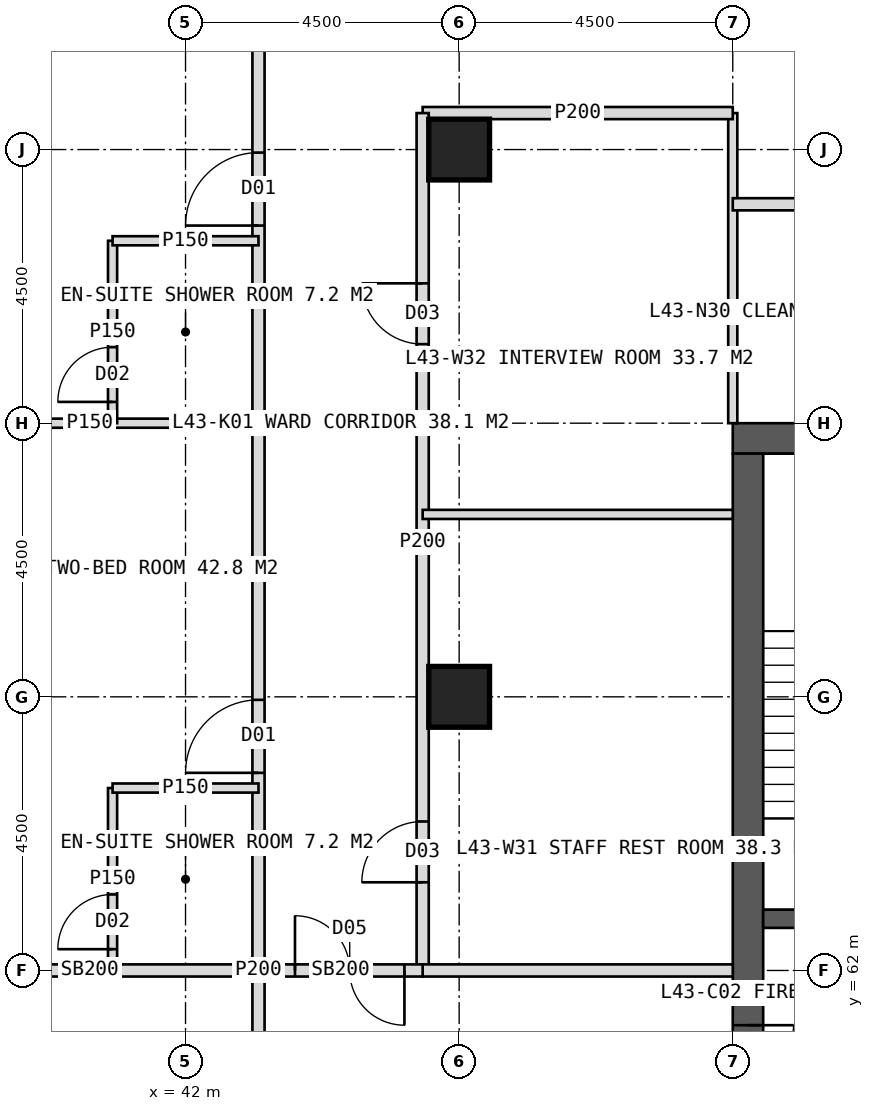
"""IFC4 building model, lengths in metres.
Left out: names, types, materials, properties, quantities, classifications, styles, units other than length and angle.
Written with IfcOpenShell. Run it as: python <this file> out.ifc"""

import sys

from ifc_helpers import new_model, si_unit, direction, frame, frame_2d, origin, origin_2d, place, context, subcontext, project, spatial, rectangle, hollow_rectangle, extrude, element, fill, save


model = new_model("IFC4")
c1 = context("Model", 3, precision=1e-05, world=origin(), true_north=direction((0.0, 1.0)))
c2 = subcontext(c1, "Body", "Model", "MODEL_VIEW")
j1 = project(units=[si_unit("LENGTHUNIT", "METRE"), si_unit("PLANEANGLEUNIT", "RADIAN")], contexts=[c1])
p1 = place(None, origin())
s1 = spatial("IfcSite", under=j1, at=p1, CompositionType="ELEMENT")
p2 = place(p1, origin())
s2 = spatial("IfcBuilding", under=s1, at=p2, CompositionType="ELEMENT")
p3 = place(p2, frame((0.0, 0.0, 181.0)))
s3 = spatial("IfcBuildingStorey", under=s2, at=p3, CompositionType="ELEMENT", Elevation=181.0)
p4 = place(p3, frame((51.0, 70.75, 0.0), z_axis=(0.0, 0.0, 1.0), x_axis=(1.0, 0.0, 0.0)))
e1 = element("IfcWall", 1, at=p4, inside=s3, PredefinedType="SHEAR", context=c2, shape_type="SweptSolid", body=[
    extrude(rectangle(XDim=18.0, YDim=0.5, at=frame_2d((9.0, 0.0))), origin(), (0.0, 0.0, 1.0), 4.0),
])
p5 = place(p4, frame((8.1, 0.0, 0.0)))
e2 = element("IfcOpeningElement", 2, at=p5, cuts=e1, PredefinedType="OPENING", context=c2, shape_type="SweptSolid", body=[
    extrude(rectangle(XDim=1.8, YDim=2.2, at=frame_2d((0.9, 1.1))), frame((0.0, 0.26, 0.0), z_axis=(0.0, -1.0, 0.0), x_axis=(1.0, 0.0, 0.0)), (0.0, 0.0, 1.0), 0.52),
])
p6 = place(p3, frame((51.25, 53.5, 0.0), z_axis=(0.0, 0.0, 1.0), x_axis=(0.0, 1.0, 0.0)))
e3 = element("IfcWall", 3, at=p6, inside=s3, PredefinedType="SHEAR", context=c2, shape_type="SweptSolid", body=[
    extrude(rectangle(XDim=17.0, YDim=0.5, at=frame_2d((8.5, 0.0))), origin(), (0.0, 0.0, 1.0), 4.0),
])
p7 = place(p6, frame((6.1, 0.0, 0.0)))
e4 = element("IfcOpeningElement", 4, at=p7, cuts=e3, PredefinedType="OPENING", context=c2, shape_type="SweptSolid", body=[
    extrude(rectangle(XDim=1.5, YDim=2.2, at=frame_2d((0.75, 1.1))), frame((0.0, 0.26, 0.0), z_axis=(0.0, -1.0, 0.0), x_axis=(1.0, 0.0, 0.0)), (0.0, 0.0, 1.0), 0.52),
])
p8 = place(p3, frame((51.5, 62.85, 0.0), z_axis=(0.0, 0.0, 1.0), x_axis=(1.0, 0.0, 0.0)))
e5 = element("IfcWall", 5, at=p8, inside=s3, PredefinedType="SHEAR", context=c2, shape_type="SweptSolid", body=[
    extrude(rectangle(XDim=3.3, YDim=0.3, at=frame_2d((1.65, 0.0))), origin(), (0.0, 0.0, 1.0), 4.0),
])
p9 = place(p8, frame((1.15, 0.0, 0.0)))
e6 = element("IfcOpeningElement", 6, at=p9, cuts=e5, PredefinedType="OPENING", context=c2, shape_type="SweptSolid", body=[
    extrude(rectangle(XDim=1.2, YDim=2.1, at=frame_2d((0.6, 1.05))), frame((0.0, 0.16, 0.0), z_axis=(0.0, -1.0, 0.0), x_axis=(1.0, 0.0, 0.0)), (0.0, 0.0, 1.0), 0.32),
])
for number, where, z_axis, x_axis in (
    (7, (46.5, 75.5, 0.0), (0.0, 0.0, 1.0), (1.0, 0.0, 0.0)),
    (8, (46.5, 66.5, 0.0), (0.0, 0.0, 1.0), (1.0, 0.0, 0.0)),
):
    element("IfcColumn", number, at=place(p3, frame(where, z_axis=z_axis, x_axis=x_axis)), inside=s3, PredefinedType="COLUMN", context=c2, shape_type="SweptSolid", body=[
        extrude(hollow_rectangle(XDim=1.0, YDim=1.0, WallThickness=0.1, at=origin_2d()), origin(), (0.0, 0.0, 1.0), 4.0),
    ])
p10 = place(p3, frame((51.0, 71.0, 0.0), z_axis=(0.0, 0.0, 1.0), x_axis=(0.0, 1.0, 0.0)))
e9 = element("IfcWall", 9, at=p10, inside=s3, PredefinedType="PARTITIONING", context=c2, shape_type="SweptSolid", body=[
    extrude(rectangle(XDim=5.1, YDim=0.15, at=frame_2d((2.55, 0.0))), origin(), (0.0, 0.0, 1.0), 3.75),
])
p11 = place(p3, frame((45.9, 76.1, 0.0), z_axis=(0.0, 0.0, 1.0), x_axis=(1.0, 0.0, 0.0)))
e10 = element("IfcWall", 10, at=p11, inside=s3, PredefinedType="PARTITIONING", context=c2, shape_type="SweptSolid", body=[
    extrude(rectangle(XDim=5.1, YDim=0.2, at=frame_2d((2.55, 0.0))), origin(), (0.0, 0.0, 1.0), 3.75),
])
p12 = place(p3, frame((51.0, 74.6, 0.0), z_axis=(0.0, 0.0, 1.0), x_axis=(1.0, 0.0, 0.0)))
e11 = element("IfcWall", 11, at=p12, inside=s3, PredefinedType="PARTITIONING", context=c2, shape_type="SweptSolid", body=[
    extrude(rectangle(XDim=6.75, YDim=0.2, at=frame_2d((3.375, 0.0))), origin(), (0.0, 0.0, 1.0), 3.75),
])
p13 = place(p12, frame((1.45, 0.0, 0.0)))
e12 = element("IfcOpeningElement", 12, at=p13, cuts=e11, PredefinedType="OPENING", context=c2, shape_type="SweptSolid", body=[
    extrude(rectangle(XDim=1.0, YDim=2.1, at=frame_2d((0.5, 1.05))), frame((0.0, 0.11, 0.0), z_axis=(0.0, -1.0, 0.0), x_axis=(1.0, 0.0, 0.0)), (0.0, 0.0, 1.0), 0.22),
])
p14 = place(p3, frame((43.2, 62.0, 0.0), z_axis=(0.0, 0.0, 1.0), x_axis=(-1.0, 0.0, 0.0)))
e13 = element("IfcWall", 13, at=p14, inside=s3, PredefinedType="SOLIDWALL", context=c2, shape_type="SweptSolid", body=[
    extrude(rectangle(XDim=5.55, YDim=0.2, at=frame_2d((2.775, 0.0))), origin(), (0.0, 0.0, 1.0), 2.95),
])
p15 = place(p3, frame((43.2, 71.0, 0.0), z_axis=(0.0, 0.0, 1.0), x_axis=(-1.0, 0.0, 0.0)))
e14 = element("IfcWall", 14, at=p15, inside=s3, PredefinedType="PARTITIONING", context=c2, shape_type="SweptSolid", body=[
    extrude(rectangle(XDim=5.55, YDim=0.15, at=frame_2d((2.775, 0.0))), origin(), (0.0, 0.0, 1.0), 3.75),
])
p16 = place(p3, frame((43.2, 45.2, 0.0), z_axis=(0.0, 0.0, 1.0), x_axis=(0.0, 1.0, 0.0)))
e15 = element("IfcWall", 15, at=p16, inside=s3, PredefinedType="PARTITIONING", context=c2, shape_type="SweptSolid", body=[
    extrude(rectangle(XDim=33.6, YDim=0.2, at=frame_2d((16.8, 0.0))), origin(), (0.0, 0.0, 1.0), 3.75),
])
p17 = place(p16, frame((2.65, 0.0, 0.0)))
e16 = element("IfcOpeningElement", 16, at=p17, cuts=e15, PredefinedType="OPENING", context=c2, shape_type="SweptSolid", body=[
    extrude(rectangle(XDim=1.2, YDim=2.2, at=frame_2d((0.6, 1.1))), frame((0.0, 0.11, 0.0), z_axis=(0.0, -1.0, 0.0), x_axis=(1.0, 0.0, 0.0)), (0.0, 0.0, 1.0), 0.22),
])
p18 = place(p16, frame((13.45, 0.0, 0.0)))
e17 = element("IfcOpeningElement", 17, at=p18, cuts=e15, PredefinedType="OPENING", context=c2, shape_type="SweptSolid", body=[
    extrude(rectangle(XDim=1.2, YDim=2.2, at=frame_2d((0.6, 1.1))), frame((0.0, 0.11, 0.0), z_axis=(0.0, -1.0, 0.0), x_axis=(1.0, 0.0, 0.0)), (0.0, 0.0, 1.0), 0.22),
])
p19 = place(p16, frame((20.05, 0.0, 0.0)))
e18 = element("IfcOpeningElement", 18, at=p19, cuts=e15, PredefinedType="OPENING", context=c2, shape_type="SweptSolid", body=[
    extrude(rectangle(XDim=1.2, YDim=2.2, at=frame_2d((0.6, 1.1))), frame((0.0, 0.11, 0.0), z_axis=(0.0, -1.0, 0.0), x_axis=(1.0, 0.0, 0.0)), (0.0, 0.0, 1.0), 0.22),
])
p20 = place(p16, frame((29.05, 0.0, 0.0)))
e19 = element("IfcOpeningElement", 19, at=p20, cuts=e15, PredefinedType="OPENING", context=c2, shape_type="SweptSolid", body=[
    extrude(rectangle(XDim=1.2, YDim=2.2, at=frame_2d((0.6, 1.1))), frame((0.0, 0.11, 0.0), z_axis=(0.0, -1.0, 0.0), x_axis=(1.0, 0.0, 0.0)), (0.0, 0.0, 1.0), 0.22),
])
p21 = place(p3, frame((40.8, 62.0, 0.0), z_axis=(0.0, 0.0, 1.0), x_axis=(0.0, 1.0, 0.0)))
e20 = element("IfcWall", 20, at=p21, inside=s3, PredefinedType="PARTITIONING", context=c2, shape_type="SweptSolid", body=[
    extrude(rectangle(XDim=3.0, YDim=0.15, at=frame_2d((1.5, 0.0))), origin(), (0.0, 0.0, 1.0), 3.75),
])
p22 = place(p21, frame((0.35, 0.0, 0.0)))
e21 = element("IfcOpeningElement", 21, at=p22, cuts=e20, PredefinedType="OPENING", context=c2, shape_type="SweptSolid", body=[
    extrude(rectangle(XDim=0.9, YDim=2.1, at=frame_2d((0.45, 1.05))), frame((0.0, 0.085, 0.0), z_axis=(0.0, -1.0, 0.0), x_axis=(1.0, 0.0, 0.0)), (0.0, 0.0, 1.0), 0.17),
])
p23 = place(p3, frame((43.2, 65.0, 0.0), z_axis=(0.0, 0.0, 1.0), x_axis=(-1.0, 0.0, 0.0)))
e22 = element("IfcWall", 22, at=p23, inside=s3, PredefinedType="PARTITIONING", context=c2, shape_type="SweptSolid", body=[
    extrude(rectangle(XDim=2.4, YDim=0.15, at=frame_2d((1.2, 0.0))), origin(), (0.0, 0.0, 1.0), 3.75),
])
p24 = place(p3, frame((40.8, 71.0, 0.0), z_axis=(0.0, 0.0, 1.0), x_axis=(0.0, 1.0, 0.0)))
e23 = element("IfcWall", 23, at=p24, inside=s3, PredefinedType="PARTITIONING", context=c2, shape_type="SweptSolid", body=[
    extrude(rectangle(XDim=3.0, YDim=0.15, at=frame_2d((1.5, 0.0))), origin(), (0.0, 0.0, 1.0), 3.75),
])
p25 = place(p24, frame((0.35, 0.0, 0.0)))
e24 = element("IfcOpeningElement", 24, at=p25, cuts=e23, PredefinedType="OPENING", context=c2, shape_type="SweptSolid", body=[
    extrude(rectangle(XDim=0.9, YDim=2.1, at=frame_2d((0.45, 1.05))), frame((0.0, 0.085, 0.0), z_axis=(0.0, -1.0, 0.0), x_axis=(1.0, 0.0, 0.0)), (0.0, 0.0, 1.0), 0.17),
])
p26 = place(p3, frame((43.2, 74.0, 0.0), z_axis=(0.0, 0.0, 1.0), x_axis=(-1.0, 0.0, 0.0)))
e25 = element("IfcWall", 25, at=p26, inside=s3, PredefinedType="PARTITIONING", context=c2, shape_type="SweptSolid", body=[
    extrude(rectangle(XDim=2.4, YDim=0.15, at=frame_2d((1.2, 0.0))), origin(), (0.0, 0.0, 1.0), 3.75),
])
p27 = place(p3, frame((45.9, 62.0, 0.0), z_axis=(0.0, 0.0, 1.0), x_axis=(0.0, 1.0, 0.0)))
e26 = element("IfcWall", 26, at=p27, inside=s3, PredefinedType="PARTITIONING", context=c2, shape_type="SweptSolid", body=[
    extrude(rectangle(XDim=14.1, YDim=0.2, at=frame_2d((7.05, 0.0))), origin(), (0.0, 0.0, 1.0), 3.75),
])
p28 = place(p27, frame((1.45, 0.0, 0.0)))
e27 = element("IfcOpeningElement", 27, at=p28, cuts=e26, PredefinedType="OPENING", context=c2, shape_type="SweptSolid", body=[
    extrude(rectangle(XDim=1.0, YDim=2.1, at=frame_2d((0.5, 1.05))), frame((0.0, 0.11, 0.0), z_axis=(0.0, -1.0, 0.0), x_axis=(1.0, 0.0, 0.0)), (0.0, 0.0, 1.0), 0.22),
])
p29 = place(p27, frame((10.3, 0.0, 0.0)))
e28 = element("IfcOpeningElement", 28, at=p29, cuts=e26, PredefinedType="OPENING", context=c2, shape_type="SweptSolid", body=[
    extrude(rectangle(XDim=1.0, YDim=2.1, at=frame_2d((0.5, 1.05))), frame((0.0, 0.11, 0.0), z_axis=(0.0, -1.0, 0.0), x_axis=(1.0, 0.0, 0.0)), (0.0, 0.0, 1.0), 0.22),
])
p30 = place(p3, frame((51.0, 62.0, 0.0), z_axis=(0.0, 0.0, 1.0), x_axis=(-1.0, 0.0, 0.0)))
e29 = element("IfcWall", 29, at=p30, inside=s3, PredefinedType="SOLIDWALL", context=c2, shape_type="SweptSolid", body=[
    extrude(rectangle(XDim=5.1, YDim=0.2, at=frame_2d((2.55, 0.0))), origin(), (0.0, 0.0, 1.0), 2.95),
])
p31 = place(p3, frame((51.0, 69.5, 0.0), z_axis=(0.0, 0.0, 1.0), x_axis=(-1.0, 0.0, 0.0)))
e30 = element("IfcWall", 30, at=p31, inside=s3, PredefinedType="PARTITIONING", context=c2, shape_type="SweptSolid", body=[
    extrude(rectangle(XDim=5.1, YDim=0.15, at=frame_2d((2.55, 0.0))), origin(), (0.0, 0.0, 1.0), 3.75),
])
p32 = place(p3, frame((45.9, 62.0, 0.0), z_axis=(0.0, 0.0, 1.0), x_axis=(-1.0, 0.0, 0.0)))
e31 = element("IfcWall", 31, at=p32, inside=s3, PredefinedType="SOLIDWALL", context=c2, shape_type="SweptSolid", body=[
    extrude(rectangle(XDim=2.7, YDim=0.2, at=frame_2d((1.35, 0.0))), origin(), (0.0, 0.0, 1.0), 2.95),
])
p33 = place(p32, frame((0.3, 0.0, 0.0)))
e32 = element("IfcOpeningElement", 32, at=p33, cuts=e31, PredefinedType="OPENING", context=c2, shape_type="SweptSolid", body=[
    extrude(rectangle(XDim=1.8, YDim=2.2, at=frame_2d((0.9, 1.1))), frame((0.0, 0.11, 0.0), z_axis=(0.0, -1.0, 0.0), x_axis=(1.0, 0.0, 0.0)), (0.0, 0.0, 1.0), 0.22),
])
p34 = place(p19, origin())
e33 = element("IfcDoor", 33, at=p34, inside=s3, OperationType="SINGLE_SWING_LEFT", PredefinedType="DOOR", context=c2, shape_type="SweptSolid", body=[
    extrude(rectangle(XDim=1.2, YDim=2.2, at=frame_2d((0.6, 1.1))), frame((0.0, 0.025, 0.0), z_axis=(0.0, -1.0, 0.0), x_axis=(1.0, 0.0, 0.0)), (0.0, 0.0, 1.0), 0.05),
])
fill(e18, e33)
p35 = place(p22, origin())
e34 = element("IfcDoor", 34, at=p35, inside=s3, OperationType="SINGLE_SWING_LEFT", PredefinedType="DOOR", context=c2, shape_type="SweptSolid", body=[
    extrude(rectangle(XDim=0.9, YDim=2.1, at=frame_2d((0.45, 1.05))), frame((0.0, 0.025, 0.0), z_axis=(0.0, -1.0, 0.0), x_axis=(1.0, 0.0, 0.0)), (0.0, 0.0, 1.0), 0.05),
])
fill(e21, e34)
p36 = place(p20, origin())
e35 = element("IfcDoor", 35, at=p36, inside=s3, OperationType="SINGLE_SWING_LEFT", PredefinedType="DOOR", context=c2, shape_type="SweptSolid", body=[
    extrude(rectangle(XDim=1.2, YDim=2.2, at=frame_2d((0.6, 1.1))), frame((0.0, 0.025, 0.0), z_axis=(0.0, -1.0, 0.0), x_axis=(1.0, 0.0, 0.0)), (0.0, 0.0, 1.0), 0.05),
])
fill(e19, e35)
p37 = place(p25, origin())
e36 = element("IfcDoor", 36, at=p37, inside=s3, OperationType="SINGLE_SWING_LEFT", PredefinedType="DOOR", context=c2, shape_type="SweptSolid", body=[
    extrude(rectangle(XDim=0.9, YDim=2.1, at=frame_2d((0.45, 1.05))), frame((0.0, 0.025, 0.0), z_axis=(0.0, -1.0, 0.0), x_axis=(1.0, 0.0, 0.0)), (0.0, 0.0, 1.0), 0.05),
])
fill(e24, e36)
p38 = place(p28, origin())
e37 = element("IfcDoor", 37, at=p38, inside=s3, OperationType="SINGLE_SWING_LEFT", PredefinedType="DOOR", context=c2, shape_type="SweptSolid", body=[
    extrude(rectangle(XDim=1.0, YDim=2.1, at=frame_2d((0.5, 1.05))), frame((0.0, 0.025, 0.0), z_axis=(0.0, -1.0, 0.0), x_axis=(1.0, 0.0, 0.0)), (0.0, 0.0, 1.0), 0.05),
])
fill(e27, e37)
p39 = place(p29, origin())
e38 = element("IfcDoor", 38, at=p39, inside=s3, OperationType="SINGLE_SWING_RIGHT", PredefinedType="DOOR", context=c2, shape_type="SweptSolid", body=[
    extrude(rectangle(XDim=1.0, YDim=2.1, at=frame_2d((0.5, 1.05))), frame((0.0, 0.025, 0.0), z_axis=(0.0, -1.0, 0.0), x_axis=(1.0, 0.0, 0.0)), (0.0, 0.0, 1.0), 0.05),
])
fill(e28, e38)
p40 = place(p33, origin())
e39 = element("IfcDoor", 39, at=p40, inside=s3, OperationType="DOUBLE_DOOR_DOUBLE_SWING", PredefinedType="DOOR", context=c2, shape_type="SweptSolid", body=[
    extrude(rectangle(XDim=1.8, YDim=2.2, at=frame_2d((0.9, 1.1))), frame((0.0, 0.025, 0.0), z_axis=(0.0, -1.0, 0.0), x_axis=(1.0, 0.0, 0.0)), (0.0, 0.0, 1.0), 0.05),
])
fill(e32, e39)
p41 = place(p7, origin())
e40 = element("IfcDoor", 40, at=p41, inside=s3, OperationType="DOUBLE_DOOR_SINGLE_SWING", PredefinedType="DOOR", context=c2, shape_type="SweptSolid", body=[
    extrude(rectangle(XDim=1.5, YDim=2.2, at=frame_2d((0.75, 1.1))), frame((0.0, 0.025, 0.0), z_axis=(0.0, -1.0, 0.0), x_axis=(1.0, 0.0, 0.0)), (0.0, 0.0, 1.0), 0.05),
])
fill(e4, e40)
save(model, sys.argv[1])
